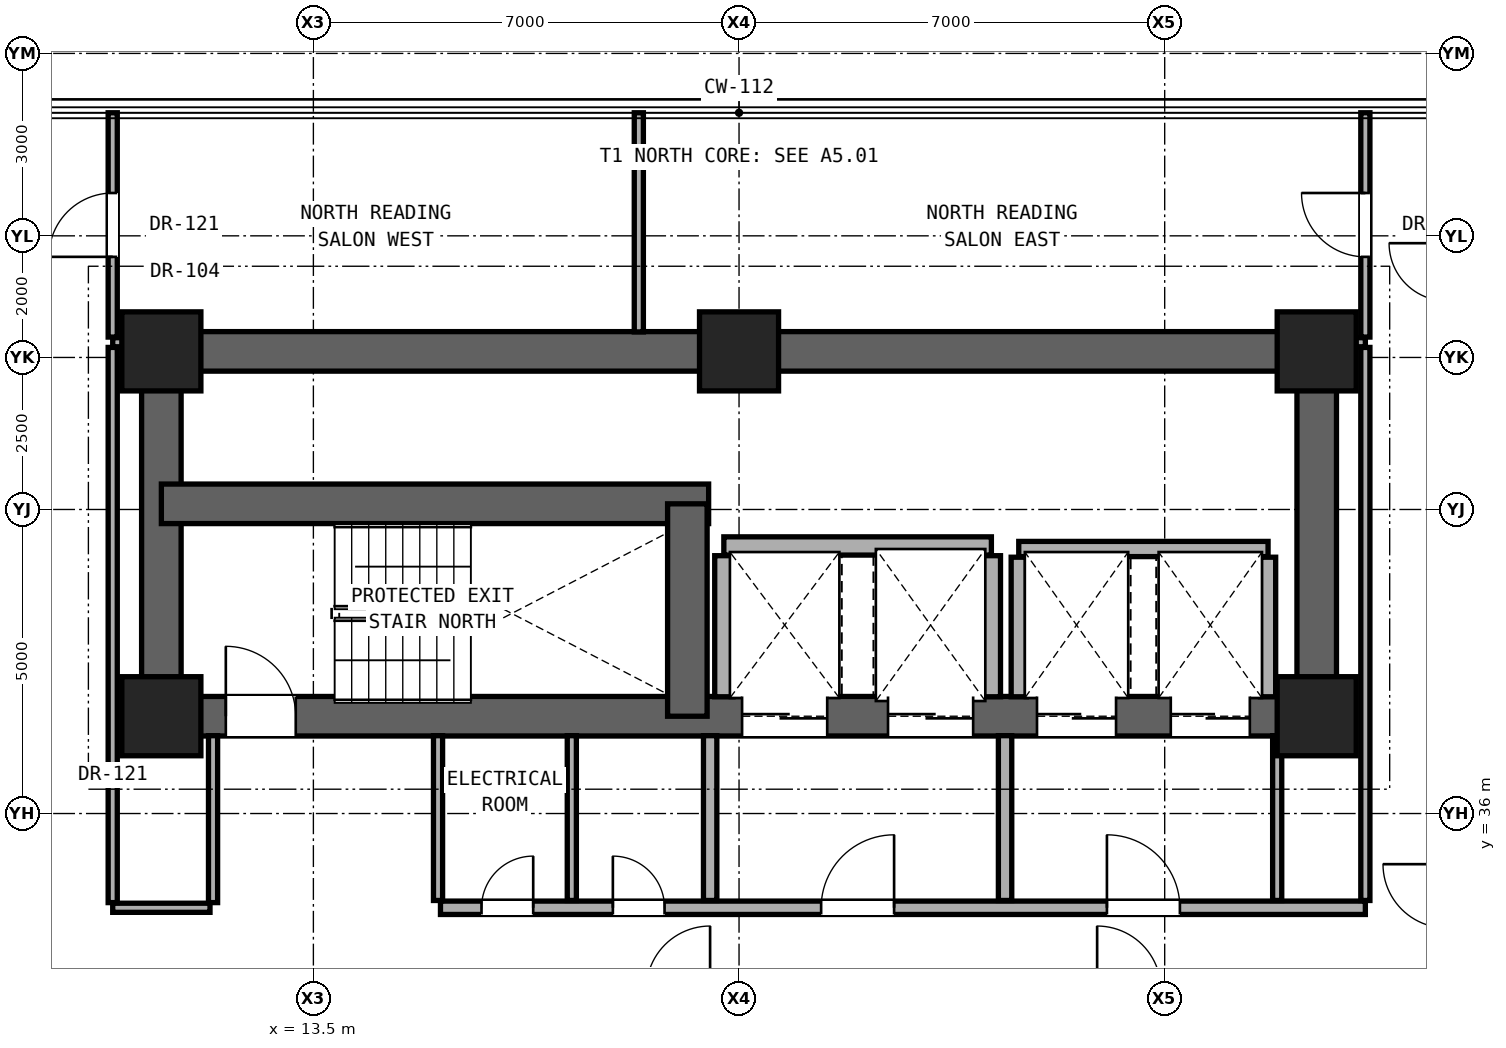
"""IFC4 building model, lengths in metres.
Left out: names, types, materials, properties, quantities, classifications, styles, units other than length and angle.
Written with IfcOpenShell. Run it as: python <this file> out.ifc"""

import sys

from ifc_helpers import new_model, si_unit, direction, frame, frame_2d, origin, origin_2d, place, context, subcontext, project, spatial, rectangle, extrude, element, fill, save


model = new_model("IFC4")
c1 = context("Model", 3, precision=1e-05, world=origin(), true_north=direction((0.0, 1.0)))
c2 = subcontext(c1, "Body", "Model", "MODEL_VIEW")
j1 = project(units=[si_unit("LENGTHUNIT", "METRE"), si_unit("PLANEANGLEUNIT", "RADIAN")], contexts=[c1])
p1 = place(None, origin())
s1 = spatial("IfcSite", under=j1, at=p1, CompositionType="ELEMENT")
p2 = place(p1, origin())
s2 = spatial("IfcBuilding", under=s1, at=p2, CompositionType="ELEMENT")
p3 = place(p2, frame((0.0, 0.0, 78.5)))
s3 = spatial("IfcBuildingStorey", under=s2, at=p3, CompositionType="ELEMENT", Elevation=78.5)
for number, where, z_axis, x_axis in (
    (1, (11.0, 37.6, 0.0), (0.0, 0.0, 1.0), (1.0, 0.0, 0.0)),
    (2, (30.0, 37.6, 0.0), (0.0, 0.0, 1.0), (1.0, 0.0, 0.0)),
    (3, (11.0, 43.6, 0.0), (0.0, 0.0, 1.0), (1.0, 0.0, 0.0)),
    (4, (20.5, 43.6, 0.0), (0.0, 0.0, 1.0), (1.0, 0.0, 0.0)),
    (5, (30.0, 43.6, 0.0), (0.0, 0.0, 1.0), (1.0, 0.0, 0.0)),
):
    element("IfcColumn", number, at=place(p3, frame(where, z_axis=z_axis, x_axis=x_axis)), inside=s3, PredefinedType="COLUMN", context=c2, shape_type="SweptSolid", body=[
        extrude(rectangle(XDim=1.3, YDim=1.3, at=origin_2d()), origin(), (0.0, 0.0, 1.0), 3.3),
    ])
p4 = place(p3, frame((11.0, 43.6, 0.0), z_axis=(0.0, 0.0, 1.0), x_axis=(1.0, 0.0, 0.0)))
e6 = element("IfcWall", 6, at=p4, inside=s3, PredefinedType="SHEAR", context=c2, shape_type="SweptSolid", body=[
    extrude(rectangle(XDim=19.0, YDim=0.65, at=frame_2d((9.5, 0.0))), origin(), (0.0, 0.0, 1.0), 2.94),
])
for number, where, z_axis, x_axis in (
    (7, (11.0, 37.6, 0.0), (0.0, 0.0, 1.0), (0.0, 1.0, 0.0)),
    (8, (30.0, 37.6, 0.0), (0.0, 0.0, 1.0), (0.0, 1.0, 0.0)),
):
    element("IfcWall", number, at=place(p3, frame(where, z_axis=z_axis, x_axis=x_axis)), inside=s3, PredefinedType="SHEAR", context=c2, shape_type="SweptSolid", body=[
        extrude(rectangle(XDim=6.0, YDim=0.65, at=frame_2d((3.0, 0.0))), origin(), (0.0, 0.0, 1.0), 2.94),
    ])
p5 = place(p3, frame((11.0, 37.6, 0.0), z_axis=(0.0, 0.0, 1.0), x_axis=(1.0, 0.0, 0.0)))
e9 = element("IfcWall", 9, at=p5, inside=s3, PredefinedType="SHEAR", context=c2, shape_type="SweptSolid", body=[
    extrude(rectangle(XDim=19.0, YDim=0.65, at=frame_2d((9.5, 0.0))), origin(), (0.0, 0.0, 1.0), 2.94),
])
p6 = place(p5, frame((1.06, 0.0, 0.0)))
e10 = element("IfcOpeningElement", 10, at=p6, cuts=e9, PredefinedType="OPENING", context=c2, shape_type="SweptSolid", body=[
    extrude(rectangle(XDim=1.15, YDim=2.2, at=frame_2d((0.575, 1.1))), frame((0.0, 0.335, 0.0), z_axis=(0.0, -1.0, 0.0), x_axis=(1.0, 0.0, 0.0)), (0.0, 0.0, 1.0), 0.67),
])
p7 = place(p5, frame((9.55, 0.0, 0.0)))
e11 = element("IfcOpeningElement", 11, at=p7, cuts=e9, PredefinedType="OPENING", context=c2, shape_type="SweptSolid", body=[
    extrude(rectangle(XDim=1.4, YDim=2.35, at=frame_2d((0.7, 1.175))), frame((0.0, 0.335, 0.0), z_axis=(0.0, -1.0, 0.0), x_axis=(1.0, 0.0, 0.0)), (0.0, 0.0, 1.0), 0.67),
])
p8 = place(p5, frame((11.95, 0.0, 0.0)))
e12 = element("IfcOpeningElement", 12, at=p8, cuts=e9, PredefinedType="OPENING", context=c2, shape_type="SweptSolid", body=[
    extrude(rectangle(XDim=1.4, YDim=2.35, at=frame_2d((0.7, 1.175))), frame((0.0, 0.335, 0.0), z_axis=(0.0, -1.0, 0.0), x_axis=(1.0, 0.0, 0.0)), (0.0, 0.0, 1.0), 0.67),
])
p9 = place(p5, frame((14.4, 0.0, 0.0)))
e13 = element("IfcOpeningElement", 13, at=p9, cuts=e9, PredefinedType="OPENING", context=c2, shape_type="SweptSolid", body=[
    extrude(rectangle(XDim=1.3, YDim=2.3, at=frame_2d((0.65, 1.15))), frame((0.0, 0.335, 0.0), z_axis=(0.0, -1.0, 0.0), x_axis=(1.0, 0.0, 0.0)), (0.0, 0.0, 1.0), 0.67),
])
p10 = place(p5, frame((16.6, 0.0, 0.0)))
e14 = element("IfcOpeningElement", 14, at=p10, cuts=e9, PredefinedType="OPENING", context=c2, shape_type="SweptSolid", body=[
    extrude(rectangle(XDim=1.3, YDim=2.3, at=frame_2d((0.65, 1.15))), frame((0.0, 0.335, 0.0), z_axis=(0.0, -1.0, 0.0), x_axis=(1.0, 0.0, 0.0)), (0.0, 0.0, 1.0), 0.67),
])
p11 = place(p3, frame((11.0, 41.093, 0.0), z_axis=(0.0, 0.0, 1.0), x_axis=(1.0, 0.0, 0.0)))
e15 = element("IfcWall", 15, at=p11, inside=s3, PredefinedType="SHEAR", context=c2, shape_type="SweptSolid", body=[
    extrude(rectangle(XDim=9.0, YDim=0.65, at=frame_2d((4.5, 0.0))), origin(), (0.0, 0.0, 1.0), 2.94),
])
p12 = place(p3, frame((19.65, 37.6, 0.0), z_axis=(0.0, 0.0, 1.0), x_axis=(0.0, 1.0, 0.0)))
e16 = element("IfcWall", 16, at=p12, inside=s3, PredefinedType="SHEAR", context=c2, shape_type="SweptSolid", body=[
    extrude(rectangle(XDim=3.493, YDim=0.65, at=frame_2d((1.747, 0.0))), origin(), (0.0, 0.0, 1.0), 2.94),
])
p13 = place(p3, frame((10.2, 34.45, 0.0), z_axis=(0.0, 0.0, 1.0), x_axis=(1.0, 0.0, 0.0)))
e17 = element("IfcWall", 17, at=p13, inside=s3, PredefinedType="PARTITIONING", context=c2, shape_type="SweptSolid", body=[
    extrude(rectangle(XDim=1.6, YDim=0.15, at=frame_2d((0.8, 0.0))), origin(), (0.0, 0.0, 1.0), 2.316),
])
p14 = place(p3, frame((15.59, 34.45, 0.0), z_axis=(0.0, 0.0, 1.0), x_axis=(1.0, 0.0, 0.0)))
e18 = element("IfcWall", 18, at=p14, inside=s3, PredefinedType="SOLIDWALL", context=c2, shape_type="SweptSolid", body=[
    extrude(rectangle(XDim=15.21, YDim=0.22, at=frame_2d((7.605, 0.0))), origin(), (0.0, 0.0, 1.0), 2.316),
])
p15 = place(p14, frame((6.26, 0.0, 0.0)))
e19 = element("IfcOpeningElement", 19, at=p15, cuts=e18, PredefinedType="OPENING", context=c2, shape_type="SweptSolid", body=[
    extrude(rectangle(XDim=1.2, YDim=2.25, at=frame_2d((0.6, 1.125))), frame((0.0, 0.12, 0.0), z_axis=(0.0, -1.0, 0.0), x_axis=(1.0, 0.0, 0.0)), (0.0, 0.0, 1.0), 0.24),
])
p16 = place(p14, frame((10.96, 0.0, 0.0)))
e20 = element("IfcOpeningElement", 20, at=p16, cuts=e18, PredefinedType="OPENING", context=c2, shape_type="SweptSolid", body=[
    extrude(rectangle(XDim=1.2, YDim=2.25, at=frame_2d((0.6, 1.125))), frame((0.0, 0.12, 0.0), z_axis=(0.0, -1.0, 0.0), x_axis=(1.0, 0.0, 0.0)), (0.0, 0.0, 1.0), 0.24),
])
p17 = place(p14, frame((0.675, 0.0, 0.0)))
e21 = element("IfcOpeningElement", 21, at=p17, cuts=e18, PredefinedType="OPENING", context=c2, shape_type="SweptSolid", body=[
    extrude(rectangle(XDim=0.85, YDim=2.01, at=frame_2d((0.425, 1.005))), frame((0.0, 0.12, 0.0), z_axis=(0.0, -1.0, 0.0), x_axis=(1.0, 0.0, 0.0)), (0.0, 0.0, 1.0), 0.24),
])
p18 = place(p14, frame((2.835, 0.0, 0.0)))
e22 = element("IfcOpeningElement", 22, at=p18, cuts=e18, PredefinedType="OPENING", context=c2, shape_type="SweptSolid", body=[
    extrude(rectangle(XDim=0.85, YDim=2.01, at=frame_2d((0.425, 1.005))), frame((0.0, 0.12, 0.0), z_axis=(0.0, -1.0, 0.0), x_axis=(1.0, 0.0, 0.0)), (0.0, 0.0, 1.0), 0.24),
])
p19 = place(p3, frame((25.1, 40.35, 0.0), z_axis=(0.0, 0.0, 1.0), x_axis=(1.0, 0.0, 0.0)))
e23 = element("IfcWall", 23, at=p19, inside=s3, PredefinedType="SOLIDWALL", context=c2, shape_type="SweptSolid", body=[
    extrude(rectangle(XDim=4.1, YDim=0.25, at=frame_2d((2.05, 0.0))), origin(), (0.0, 0.0, 1.0), 2.94),
])
p20 = place(p3, frame((20.25, 40.4, 0.0), z_axis=(0.0, 0.0, 1.0), x_axis=(1.0, 0.0, 0.0)))
e24 = element("IfcWall", 24, at=p20, inside=s3, PredefinedType="SOLIDWALL", context=c2, shape_type="SweptSolid", body=[
    extrude(rectangle(XDim=4.4, YDim=0.3, at=frame_2d((2.2, 0.0))), origin(), (0.0, 0.0, 1.0), 2.94),
])
for number, where, z_axis, x_axis in (
    (25, (10.2, 43.75, 0.0), (0.0, 0.0, 1.0), (1.0, 0.0, 0.0)),
    (26, (30.32, 43.75, 0.0), (0.0, 0.0, 1.0), (1.0, 0.0, 0.0)),
):
    element("IfcWall", number, at=place(p3, frame(where, z_axis=z_axis, x_axis=x_axis)), inside=s3, PredefinedType="PARTITIONING", context=c2, shape_type="SweptSolid", body=[
        extrude(rectangle(XDim=0.48, YDim=0.15, at=frame_2d((0.24, 0.0))), origin(), (0.0, 0.0, 1.0), 2.94),
    ])
p21 = place(p3, frame((10.2, 34.535, 0.0), z_axis=(0.0, 0.0, 1.0), x_axis=(0.0, 1.0, 0.0)))
e27 = element("IfcWall", 27, at=p21, inside=s3, PredefinedType="PARTITIONING", context=c2, shape_type="SweptSolid", body=[
    extrude(rectangle(XDim=9.13, YDim=0.15, at=frame_2d((4.565, 0.0))), origin(), (0.0, 0.0, 1.0), 2.316),
])
p22 = place(p3, frame((10.2, 43.835, 0.0), z_axis=(0.0, 0.0, 1.0), x_axis=(0.0, 1.0, 0.0)))
e28 = element("IfcWall", 28, at=p22, inside=s3, PredefinedType="PARTITIONING", context=c2, shape_type="SweptSolid", body=[
    extrude(rectangle(XDim=3.689, YDim=0.15, at=frame_2d((1.844, 0.0))), origin(), (0.0, 0.0, 1.0), 2.94),
])
p23 = place(p22, frame((1.32, 0.0, 0.0)))
e29 = element("IfcOpeningElement", 29, at=p23, cuts=e28, PredefinedType="OPENING", context=c2, shape_type="SweptSolid", body=[
    extrude(rectangle(XDim=1.05, YDim=2.2, at=frame_2d((0.525, 1.1))), frame((0.0, 0.085, 0.0), z_axis=(0.0, -1.0, 0.0), x_axis=(1.0, 0.0, 0.0)), (0.0, 0.0, 1.0), 0.17),
])
p24 = place(p3, frame((11.85, 34.535, 0.0), z_axis=(0.0, 0.0, 1.0), x_axis=(0.0, 1.0, 0.0)))
e30 = element("IfcWall", 30, at=p24, inside=s3, PredefinedType="PARTITIONING", context=c2, shape_type="SweptSolid", body=[
    extrude(rectangle(XDim=2.745, YDim=0.15, at=frame_2d((1.373, 0.0))), origin(), (0.0, 0.0, 1.0), 2.94),
])
p25 = place(p3, frame((15.55, 34.57, 0.0), z_axis=(0.0, 0.0, 1.0), x_axis=(0.0, 1.0, 0.0)))
e31 = element("IfcWall", 31, at=p25, inside=s3, PredefinedType="PARTITIONING", context=c2, shape_type="SweptSolid", body=[
    extrude(rectangle(XDim=2.71, YDim=0.15, at=frame_2d((1.355, 0.0))), origin(), (0.0, 0.0, 1.0), 2.469),
])
p26 = place(p3, frame((17.75, 34.57, 0.0), z_axis=(0.0, 0.0, 1.0), x_axis=(0.0, 1.0, 0.0)))
e32 = element("IfcWall", 32, at=p26, inside=s3, PredefinedType="PARTITIONING", context=c2, shape_type="SweptSolid", body=[
    extrude(rectangle(XDim=2.71, YDim=0.15, at=frame_2d((1.355, 0.0))), origin(), (0.0, 0.0, 1.0), 2.94),
])
p27 = place(p3, frame((18.852, 43.92, 0.0), z_axis=(0.0, 0.0, 1.0), x_axis=(0.0, 1.0, 0.0)))
e33 = element("IfcWall", 33, at=p27, inside=s3, PredefinedType="PARTITIONING", context=c2, shape_type="SweptSolid", body=[
    extrude(rectangle(XDim=3.604, YDim=0.15, at=frame_2d((1.802, 0.0))), origin(), (0.0, 0.0, 1.0), 2.94),
])
p28 = place(p3, frame((20.025, 34.57, 0.0), z_axis=(0.0, 0.0, 1.0), x_axis=(0.0, 1.0, 0.0)))
e34 = element("IfcWall", 34, at=p28, inside=s3, PredefinedType="SOLIDWALL", context=c2, shape_type="SweptSolid", body=[
    extrude(rectangle(XDim=2.71, YDim=0.22, at=frame_2d((1.355, 0.0))), origin(), (0.0, 0.0, 1.0), 2.94),
])
for number, where, z_axis, x_axis in (
    (35, (20.25, 37.92, 0.0), (0.0, 0.0, 1.0), (0.0, 1.0, 0.0)),
    (36, (24.65, 37.92, 0.0), (0.0, 0.0, 1.0), (0.0, 1.0, 0.0)),
):
    element("IfcWall", number, at=place(p3, frame(where, z_axis=z_axis, x_axis=x_axis)), inside=s3, PredefinedType="SOLIDWALL", context=c2, shape_type="SweptSolid", body=[
        extrude(rectangle(XDim=2.32, YDim=0.3, at=frame_2d((1.16, 0.0))), origin(), (0.0, 0.0, 1.0), 2.94),
    ])
p29 = place(p3, frame((24.875, 34.57, 0.0), z_axis=(0.0, 0.0, 1.0), x_axis=(0.0, 1.0, 0.0)))
e37 = element("IfcWall", 37, at=p29, inside=s3, PredefinedType="SOLIDWALL", context=c2, shape_type="SweptSolid", body=[
    extrude(rectangle(XDim=2.71, YDim=0.22, at=frame_2d((1.355, 0.0))), origin(), (0.0, 0.0, 1.0), 2.94),
])
p30 = place(p3, frame((25.1, 37.92, 0.0), z_axis=(0.0, 0.0, 1.0), x_axis=(0.0, 1.0, 0.0)))
e38 = element("IfcWall", 38, at=p30, inside=s3, PredefinedType="SOLIDWALL", context=c2, shape_type="SweptSolid", body=[
    extrude(rectangle(XDim=2.295, YDim=0.25, at=frame_2d((1.147, 0.0))), origin(), (0.0, 0.0, 1.0), 2.94),
])
p31 = place(p3, frame((29.35, 34.57, 0.0), z_axis=(0.0, 0.0, 1.0), x_axis=(0.0, 1.0, 0.0)))
e39 = element("IfcWall", 39, at=p31, inside=s3, PredefinedType="PARTITIONING", context=c2, shape_type="SweptSolid", body=[
    extrude(rectangle(XDim=2.71, YDim=0.15, at=frame_2d((1.355, 0.0))), origin(), (0.0, 0.0, 1.0), 2.94),
])
p32 = place(p3, frame((29.2, 37.92, 0.0), z_axis=(0.0, 0.0, 1.0), x_axis=(0.0, 1.0, 0.0)))
e40 = element("IfcWall", 40, at=p32, inside=s3, PredefinedType="SOLIDWALL", context=c2, shape_type="SweptSolid", body=[
    extrude(rectangle(XDim=2.295, YDim=0.25, at=frame_2d((1.147, 0.0))), origin(), (0.0, 0.0, 1.0), 2.94),
])
p33 = place(p3, frame((30.8, 34.57, 0.0), z_axis=(0.0, 0.0, 1.0), x_axis=(0.0, 1.0, 0.0)))
e41 = element("IfcWall", 41, at=p33, inside=s3, PredefinedType="PARTITIONING", context=c2, shape_type="SweptSolid", body=[
    extrude(rectangle(XDim=9.095, YDim=0.15, at=frame_2d((4.547, 0.0))), origin(), (0.0, 0.0, 1.0), 2.316),
])
p34 = place(p3, frame((30.8, 43.835, 0.0), z_axis=(0.0, 0.0, 1.0), x_axis=(0.0, 1.0, 0.0)))
e42 = element("IfcWall", 42, at=p34, inside=s3, PredefinedType="PARTITIONING", context=c2, shape_type="SweptSolid", body=[
    extrude(rectangle(XDim=3.689, YDim=0.15, at=frame_2d((1.844, 0.0))), origin(), (0.0, 0.0, 1.0), 2.94),
])
p35 = place(p34, frame((1.32, 0.0, 0.0)))
e43 = element("IfcOpeningElement", 43, at=p35, cuts=e42, PredefinedType="OPENING", context=c2, shape_type="SweptSolid", body=[
    extrude(rectangle(XDim=1.05, YDim=2.2, at=frame_2d((0.525, 1.1))), frame((0.0, 0.085, 0.0), z_axis=(0.0, -1.0, 0.0), x_axis=(1.0, 0.0, 0.0)), (0.0, 0.0, 1.0), 0.17),
])
p36 = place(p6, origin())
e44 = element("IfcDoor", 44, at=p36, inside=s3, OperationType="SINGLE_SWING_LEFT", PredefinedType="DOOR", context=c2, shape_type="SweptSolid", body=[
    extrude(rectangle(XDim=1.15, YDim=2.2, at=frame_2d((0.575, 1.1))), frame((0.0, 0.025, 0.0), z_axis=(0.0, -1.0, 0.0), x_axis=(1.0, 0.0, 0.0)), (0.0, 0.0, 1.0), 0.05),
])
fill(e10, e44)
p37 = place(p15, origin())
e45 = element("IfcDoor", 45, at=p37, inside=s3, OperationType="SINGLE_SWING_RIGHT", PredefinedType="DOOR", context=c2, shape_type="SweptSolid", body=[
    extrude(rectangle(XDim=1.2, YDim=2.25, at=frame_2d((0.6, 1.125))), frame((0.0, 0.025, 0.0), z_axis=(0.0, -1.0, 0.0), x_axis=(1.0, 0.0, 0.0)), (0.0, 0.0, 1.0), 0.05),
])
fill(e19, e45)
p38 = place(p16, origin())
e46 = element("IfcDoor", 46, at=p38, inside=s3, OperationType="SINGLE_SWING_LEFT", PredefinedType="DOOR", context=c2, shape_type="SweptSolid", body=[
    extrude(rectangle(XDim=1.2, YDim=2.25, at=frame_2d((0.6, 1.125))), frame((0.0, 0.025, 0.0), z_axis=(0.0, -1.0, 0.0), x_axis=(1.0, 0.0, 0.0)), (0.0, 0.0, 1.0), 0.05),
])
fill(e20, e46)
p39 = place(p17, origin())
e47 = element("IfcDoor", 47, at=p39, inside=s3, OperationType="SINGLE_SWING_RIGHT", PredefinedType="DOOR", context=c2, shape_type="SweptSolid", body=[
    extrude(rectangle(XDim=0.85, YDim=2.01, at=frame_2d((0.425, 1.005))), frame((0.0, 0.025, 0.0), z_axis=(0.0, -1.0, 0.0), x_axis=(1.0, 0.0, 0.0)), (0.0, 0.0, 1.0), 0.05),
])
fill(e21, e47)
p40 = place(p18, origin())
e48 = element("IfcDoor", 48, at=p40, inside=s3, OperationType="SINGLE_SWING_LEFT", PredefinedType="DOOR", context=c2, shape_type="SweptSolid", body=[
    extrude(rectangle(XDim=0.85, YDim=2.01, at=frame_2d((0.425, 1.005))), frame((0.0, 0.025, 0.0), z_axis=(0.0, -1.0, 0.0), x_axis=(1.0, 0.0, 0.0)), (0.0, 0.0, 1.0), 0.05),
])
fill(e22, e48)
p41 = place(p23, origin())
e49 = element("IfcDoor", 49, at=p41, inside=s3, OperationType="SINGLE_SWING_LEFT", PredefinedType="DOOR", context=c2, shape_type="SweptSolid", body=[
    extrude(rectangle(XDim=1.05, YDim=2.2, at=frame_2d((0.525, 1.1))), frame((0.0, 0.025, 0.0), z_axis=(0.0, -1.0, 0.0), x_axis=(1.0, 0.0, 0.0)), (0.0, 0.0, 1.0), 0.05),
])
fill(e29, e49)
p42 = place(p35, origin())
e50 = element("IfcDoor", 50, at=p42, inside=s3, OperationType="SINGLE_SWING_RIGHT", PredefinedType="DOOR", context=c2, shape_type="SweptSolid", body=[
    extrude(rectangle(XDim=1.05, YDim=2.2, at=frame_2d((0.525, 1.1))), frame((0.0, 0.025, 0.0), z_axis=(0.0, -1.0, 0.0), x_axis=(1.0, 0.0, 0.0)), (0.0, 0.0, 1.0), 0.05),
])
fill(e43, e50)
p43 = place(p7, origin())
e51 = element("IfcDoor", 51, at=p43, inside=s3, OperationType="DOUBLE_DOOR_SLIDING", PredefinedType="DOOR", context=c2, shape_type="SweptSolid", body=[
    extrude(rectangle(XDim=1.4, YDim=2.35, at=frame_2d((0.7, 1.175))), frame((0.0, 0.025, 0.0), z_axis=(0.0, -1.0, 0.0), x_axis=(1.0, 0.0, 0.0)), (0.0, 0.0, 1.0), 0.05),
])
fill(e11, e51)
p44 = place(p8, origin())
e52 = element("IfcDoor", 52, at=p44, inside=s3, OperationType="DOUBLE_DOOR_SLIDING", PredefinedType="DOOR", context=c2, shape_type="SweptSolid", body=[
    extrude(rectangle(XDim=1.4, YDim=2.35, at=frame_2d((0.7, 1.175))), frame((0.0, 0.025, 0.0), z_axis=(0.0, -1.0, 0.0), x_axis=(1.0, 0.0, 0.0)), (0.0, 0.0, 1.0), 0.05),
])
fill(e12, e52)
p45 = place(p9, origin())
e53 = element("IfcDoor", 53, at=p45, inside=s3, OperationType="DOUBLE_DOOR_SLIDING", PredefinedType="DOOR", context=c2, shape_type="SweptSolid", body=[
    extrude(rectangle(XDim=1.3, YDim=2.3, at=frame_2d((0.65, 1.15))), frame((0.0, 0.025, 0.0), z_axis=(0.0, -1.0, 0.0), x_axis=(1.0, 0.0, 0.0)), (0.0, 0.0, 1.0), 0.05),
])
fill(e13, e53)
p46 = place(p10, origin())
e54 = element("IfcDoor", 54, at=p46, inside=s3, OperationType="DOUBLE_DOOR_SLIDING", PredefinedType="DOOR", context=c2, shape_type="SweptSolid", body=[
    extrude(rectangle(XDim=1.3, YDim=2.3, at=frame_2d((0.65, 1.15))), frame((0.0, 0.025, 0.0), z_axis=(0.0, -1.0, 0.0), x_axis=(1.0, 0.0, 0.0)), (0.0, 0.0, 1.0), 0.05),
])
fill(e14, e54)
save(model, sys.argv[1])
